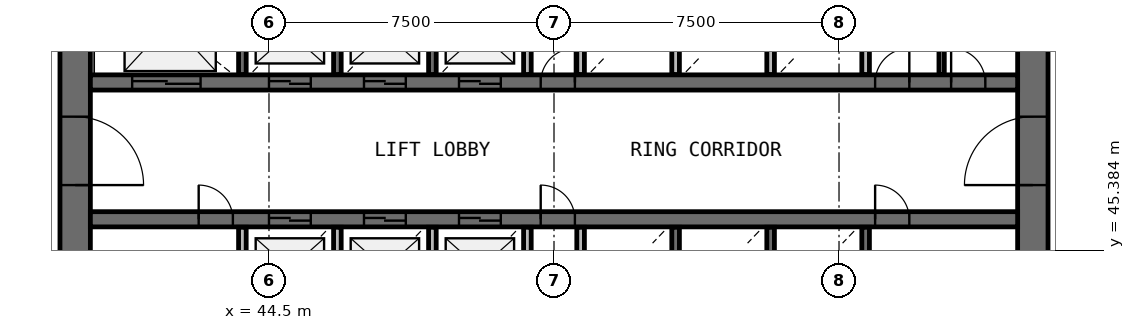
"""IFC4 building model, lengths in metres.
Left out: names, types, materials, properties, quantities, classifications, styles, units other than length and angle.
Written with IfcOpenShell. Run it as: python <this file> out.ifc"""

import sys

from ifc_helpers import new_model, si_unit, direction, frame, frame_2d, origin, place, context, subcontext, project, spatial, rectangle, extrude, source, transform, mapped, element, fill, save


model = new_model("IFC4")
c1 = context("Model", 3, precision=1e-05, world=origin(), true_north=direction((0.0, 1.0)))
c2 = subcontext(c1, "Body", "Model", "MODEL_VIEW")
j1 = project(units=[si_unit("LENGTHUNIT", "METRE"), si_unit("PLANEANGLEUNIT", "RADIAN")], contexts=[c1])
p1 = place(None, origin())
s1 = spatial("IfcSite", under=j1, at=p1, CompositionType="ELEMENT")
p2 = place(p1, origin())
s2 = spatial("IfcBuilding", under=s1, at=p2, CompositionType="ELEMENT")
p3 = place(p2, frame((0.0, 0.0, 88.0)))
s3 = spatial("IfcBuildingStorey", under=s2, at=p3, CompositionType="ELEMENT", Elevation=88.0)
p4 = place(p3, frame((64.6, 38.0, 0.0), z_axis=(0.0, 0.0, 1.0), x_axis=(0.0, 1.0, 0.0)))
e1 = element("IfcWall", 1, at=p4, inside=s3, PredefinedType="SHEAR", context=c2, shape_type="SweptSolid", body=[
    extrude(rectangle(XDim=20.0, YDim=0.8, at=frame_2d((10.0, 0.0))), origin(), (0.0, 0.0, 1.0), 4.1),
])
p5 = place(p4, frame((9.1, 0.0, 0.0)))
e2 = element("IfcOpeningElement", 2, at=p5, cuts=e1, PredefinedType="OPENING", context=c2, shape_type="SweptSolid", body=[
    extrude(rectangle(XDim=1.8, YDim=2.1, at=frame_2d((0.9, 1.05))), frame((0.0, 0.41, 0.0), z_axis=(0.0, -1.0, 0.0), x_axis=(1.0, 0.0, 0.0)), (0.0, 0.0, 1.0), 0.82),
])
p6 = place(p3, frame((39.4, 58.0, 0.0), z_axis=(0.0, 0.0, 1.0), x_axis=(0.0, -1.0, 0.0)))
e3 = element("IfcWall", 3, at=p6, inside=s3, PredefinedType="SHEAR", context=c2, shape_type="SweptSolid", body=[
    extrude(rectangle(XDim=20.0, YDim=0.8, at=frame_2d((10.0, 0.0))), origin(), (0.0, 0.0, 1.0), 4.1),
])
p7 = place(p6, frame((9.1, 0.0, 0.0)))
e4 = element("IfcOpeningElement", 4, at=p7, cuts=e3, PredefinedType="OPENING", context=c2, shape_type="SweptSolid", body=[
    extrude(rectangle(XDim=1.8, YDim=2.1, at=frame_2d((0.9, 1.05))), frame((0.0, 0.41, 0.0), z_axis=(0.0, -1.0, 0.0), x_axis=(1.0, 0.0, 0.0)), (0.0, 0.0, 1.0), 0.82),
])
p8 = place(p3, frame((39.8, 49.8, 0.0), z_axis=(0.0, 0.0, 1.0), x_axis=(1.0, 0.0, 0.0)))
e5 = element("IfcWall", 5, at=p8, inside=s3, PredefinedType="SHEAR", context=c2, shape_type="SweptSolid", body=[
    extrude(rectangle(XDim=24.4, YDim=0.4, at=frame_2d((12.2, 0.0))), origin(), (0.0, 0.0, 1.0), 4.1),
])
p9 = place(p8, frame((4.7, 0.0, 0.0)))
e6 = element("IfcOpeningElement", 6, at=p9, cuts=e5, PredefinedType="OPENING", context=c2, shape_type="SweptSolid", body=[
    extrude(rectangle(XDim=1.1, YDim=2.1, at=frame_2d((0.55, 1.05))), frame((0.0, 0.21, 0.0), z_axis=(0.0, -1.0, 0.0), x_axis=(1.0, 0.0, 0.0)), (0.0, 0.0, 1.0), 0.42),
])
p10 = place(p8, frame((7.2, 0.0, 0.0)))
e7 = element("IfcOpeningElement", 7, at=p10, cuts=e5, PredefinedType="OPENING", context=c2, shape_type="SweptSolid", body=[
    extrude(rectangle(XDim=1.1, YDim=2.1, at=frame_2d((0.55, 1.05))), frame((0.0, 0.21, 0.0), z_axis=(0.0, -1.0, 0.0), x_axis=(1.0, 0.0, 0.0)), (0.0, 0.0, 1.0), 0.42),
])
p11 = place(p8, frame((9.7, 0.0, 0.0)))
e8 = element("IfcOpeningElement", 8, at=p11, cuts=e5, PredefinedType="OPENING", context=c2, shape_type="SweptSolid", body=[
    extrude(rectangle(XDim=1.1, YDim=2.1, at=frame_2d((0.55, 1.05))), frame((0.0, 0.21, 0.0), z_axis=(0.0, -1.0, 0.0), x_axis=(1.0, 0.0, 0.0)), (0.0, 0.0, 1.0), 0.42),
])
p12 = place(p8, frame((1.1, 0.0, 0.0)))
e9 = element("IfcOpeningElement", 9, at=p12, cuts=e5, PredefinedType="OPENING", context=c2, shape_type="SweptSolid", body=[
    extrude(rectangle(XDim=1.8, YDim=2.4, at=frame_2d((0.9, 1.2))), frame((0.0, 0.21, 0.0), z_axis=(0.0, -1.0, 0.0), x_axis=(1.0, 0.0, 0.0)), (0.0, 0.0, 1.0), 0.42),
])
p13 = place(p8, frame((20.65, 0.0, 0.0)))
e10 = element("IfcOpeningElement", 10, at=p13, cuts=e5, PredefinedType="OPENING", context=c2, shape_type="SweptSolid", body=[
    extrude(rectangle(XDim=0.9, YDim=2.1, at=frame_2d((0.45, 1.05))), frame((0.0, 0.21, 0.0), z_axis=(0.0, -1.0, 0.0), x_axis=(1.0, 0.0, 0.0)), (0.0, 0.0, 1.0), 0.42),
])
p14 = place(p8, frame((22.65, 0.0, 0.0)))
e11 = element("IfcOpeningElement", 11, at=p14, cuts=e5, PredefinedType="OPENING", context=c2, shape_type="SweptSolid", body=[
    extrude(rectangle(XDim=0.9, YDim=2.1, at=frame_2d((0.45, 1.05))), frame((0.0, 0.21, 0.0), z_axis=(0.0, -1.0, 0.0), x_axis=(1.0, 0.0, 0.0)), (0.0, 0.0, 1.0), 0.42),
])
p15 = place(p8, frame((11.85, 0.0, 0.0)))
e12 = element("IfcOpeningElement", 12, at=p15, cuts=e5, PredefinedType="OPENING", context=c2, shape_type="SweptSolid", body=[
    extrude(rectangle(XDim=0.9, YDim=2.1, at=frame_2d((0.45, 1.05))), frame((0.0, 0.21, 0.0), z_axis=(0.0, -1.0, 0.0), x_axis=(1.0, 0.0, 0.0)), (0.0, 0.0, 1.0), 0.42),
])
p16 = place(p3, frame((39.8, 46.2, 0.0), z_axis=(0.0, 0.0, 1.0), x_axis=(1.0, 0.0, 0.0)))
e13 = element("IfcWall", 13, at=p16, inside=s3, PredefinedType="SHEAR", context=c2, shape_type="SweptSolid", body=[
    extrude(rectangle(XDim=24.4, YDim=0.4, at=frame_2d((12.2, 0.0))), origin(), (0.0, 0.0, 1.0), 4.1),
])
p17 = place(p16, frame((4.7, 0.0, 0.0)))
e14 = element("IfcOpeningElement", 14, at=p17, cuts=e13, PredefinedType="OPENING", context=c2, shape_type="SweptSolid", body=[
    extrude(rectangle(XDim=1.1, YDim=2.1, at=frame_2d((0.55, 1.05))), frame((0.0, 0.21, 0.0), z_axis=(0.0, -1.0, 0.0), x_axis=(1.0, 0.0, 0.0)), (0.0, 0.0, 1.0), 0.42),
])
p18 = place(p16, frame((7.2, 0.0, 0.0)))
e15 = element("IfcOpeningElement", 15, at=p18, cuts=e13, PredefinedType="OPENING", context=c2, shape_type="SweptSolid", body=[
    extrude(rectangle(XDim=1.1, YDim=2.1, at=frame_2d((0.55, 1.05))), frame((0.0, 0.21, 0.0), z_axis=(0.0, -1.0, 0.0), x_axis=(1.0, 0.0, 0.0)), (0.0, 0.0, 1.0), 0.42),
])
p19 = place(p16, frame((9.7, 0.0, 0.0)))
e16 = element("IfcOpeningElement", 16, at=p19, cuts=e13, PredefinedType="OPENING", context=c2, shape_type="SweptSolid", body=[
    extrude(rectangle(XDim=1.1, YDim=2.1, at=frame_2d((0.55, 1.05))), frame((0.0, 0.21, 0.0), z_axis=(0.0, -1.0, 0.0), x_axis=(1.0, 0.0, 0.0)), (0.0, 0.0, 1.0), 0.42),
])
p20 = place(p16, frame((20.65, 0.0, 0.0)))
e17 = element("IfcOpeningElement", 17, at=p20, cuts=e13, PredefinedType="OPENING", context=c2, shape_type="SweptSolid", body=[
    extrude(rectangle(XDim=0.9, YDim=2.1, at=frame_2d((0.45, 1.05))), frame((0.0, 0.21, 0.0), z_axis=(0.0, -1.0, 0.0), x_axis=(1.0, 0.0, 0.0)), (0.0, 0.0, 1.0), 0.42),
])
p21 = place(p16, frame((2.85, 0.0, 0.0)))
e18 = element("IfcOpeningElement", 18, at=p21, cuts=e13, PredefinedType="OPENING", context=c2, shape_type="SweptSolid", body=[
    extrude(rectangle(XDim=0.9, YDim=2.1, at=frame_2d((0.45, 1.05))), frame((0.0, 0.21, 0.0), z_axis=(0.0, -1.0, 0.0), x_axis=(1.0, 0.0, 0.0)), (0.0, 0.0, 1.0), 0.42),
])
p22 = place(p16, frame((11.85, 0.0, 0.0)))
e19 = element("IfcOpeningElement", 19, at=p22, cuts=e13, PredefinedType="OPENING", context=c2, shape_type="SweptSolid", body=[
    extrude(rectangle(XDim=0.9, YDim=2.1, at=frame_2d((0.45, 1.05))), frame((0.0, 0.21, 0.0), z_axis=(0.0, -1.0, 0.0), x_axis=(1.0, 0.0, 0.0)), (0.0, 0.0, 1.0), 0.42),
])
for number, where, z_axis, x_axis in (
    (20, (43.8, 45.99, 0.0), (0.0, 0.0, 1.0), (0.0, -1.0, 0.0)),
    (21, (43.8, 52.37, 0.0), (0.0, 0.0, 1.0), (0.0, -1.0, 0.0)),
):
    element("IfcWall", number, at=place(p3, frame(where, z_axis=z_axis, x_axis=x_axis)), inside=s3, PredefinedType="SOLIDWALL", context=c2, shape_type="SweptSolid", body=[
        extrude(rectangle(XDim=2.36, YDim=0.2, at=frame_2d((1.18, 0.0))), origin(), (0.0, 0.0, 1.0), 3.7),
    ])
p23 = place(p3, frame((46.3, 43.6, 0.0), z_axis=(0.0, 0.0, 1.0), x_axis=(0.0, 1.0, 0.0)))
e22 = element("IfcWall", 22, at=p23, inside=s3, PredefinedType="SOLIDWALL", context=c2, shape_type="SweptSolid", body=[
    extrude(rectangle(XDim=2.39, YDim=0.2, at=frame_2d((1.195, 0.0))), origin(), (0.0, 0.0, 1.0), 3.7),
])
for number, where, z_axis, x_axis in (
    (23, (46.3, 50.01, 0.0), (0.0, 0.0, 1.0), (0.0, 1.0, 0.0)),
    (24, (48.8, 43.63, 0.0), (0.0, 0.0, 1.0), (0.0, 1.0, 0.0)),
    (25, (48.8, 50.01, 0.0), (0.0, 0.0, 1.0), (0.0, 1.0, 0.0)),
    (26, (51.3, 43.63, 0.0), (0.0, 0.0, 1.0), (0.0, 1.0, 0.0)),
):
    element("IfcWall", number, at=place(p3, frame(where, z_axis=z_axis, x_axis=x_axis)), inside=s3, PredefinedType="SOLIDWALL", context=c2, shape_type="SweptSolid", body=[
        extrude(rectangle(XDim=2.36, YDim=0.2, at=frame_2d((1.18, 0.0))), origin(), (0.0, 0.0, 1.0), 3.7),
    ])
for number, where, z_axis, x_axis in (
    (27, (51.3, 50.01, 0.0), (0.0, 0.0, 1.0), (0.0, 1.0, 0.0)),
    (28, (52.7, 45.99, 0.0), (0.0, 0.0, 1.0), (0.0, -1.0, 0.0)),
):
    element("IfcWall", number, at=place(p3, frame(where, z_axis=z_axis, x_axis=x_axis)), inside=s3, PredefinedType="SOLIDWALL", context=c2, shape_type="SweptSolid", body=[
        extrude(rectangle(XDim=2.39, YDim=0.2, at=frame_2d((1.195, 0.0))), origin(), (0.0, 0.0, 1.0), 3.7),
    ])
for number, where, z_axis, x_axis in (
    (29, (52.7, 52.37, 0.0), (0.0, 0.0, 1.0), (0.0, -1.0, 0.0)),
    (30, (55.2, 43.63, 0.0), (0.0, 0.0, 1.0), (0.0, 1.0, 0.0)),
    (31, (55.2, 50.01, 0.0), (0.0, 0.0, 1.0), (0.0, 1.0, 0.0)),
    (32, (57.7, 43.63, 0.0), (0.0, 0.0, 1.0), (0.0, 1.0, 0.0)),
):
    element("IfcWall", number, at=place(p3, frame(where, z_axis=z_axis, x_axis=x_axis)), inside=s3, PredefinedType="SOLIDWALL", context=c2, shape_type="SweptSolid", body=[
        extrude(rectangle(XDim=2.36, YDim=0.2, at=frame_2d((1.18, 0.0))), origin(), (0.0, 0.0, 1.0), 3.7),
    ])
p24 = place(p3, frame((57.7, 50.01, 0.0), z_axis=(0.0, 0.0, 1.0), x_axis=(0.0, 1.0, 0.0)))
e33 = element("IfcWall", 33, at=p24, inside=s3, PredefinedType="SOLIDWALL", context=c2, shape_type="SweptSolid", body=[
    extrude(rectangle(XDim=2.39, YDim=0.2, at=frame_2d((1.195, 0.0))), origin(), (0.0, 0.0, 1.0), 3.7),
])
for number, where, z_axis, x_axis in (
    (34, (60.2, 43.63, 0.0), (0.0, 0.0, 1.0), (0.0, 1.0, 0.0)),
    (35, (60.2, 50.01, 0.0), (0.0, 0.0, 1.0), (0.0, 1.0, 0.0)),
):
    element("IfcWall", number, at=place(p3, frame(where, z_axis=z_axis, x_axis=x_axis)), inside=s3, PredefinedType="SOLIDWALL", context=c2, shape_type="SweptSolid", body=[
        extrude(rectangle(XDim=2.36, YDim=0.2, at=frame_2d((1.18, 0.0))), origin(), (0.0, 0.0, 1.0), 3.7),
    ])
p25 = place(p3, frame((62.2, 50.01, 0.0), z_axis=(0.0, 0.0, 1.0), x_axis=(0.0, 1.0, 0.0)))
e36 = element("IfcWall", 36, at=p25, inside=s3, PredefinedType="PARTITIONING", context=c2, shape_type="SweptSolid", body=[
    extrude(rectangle(XDim=2.39, YDim=0.14, at=frame_2d((1.195, 0.0))), origin(), (0.0, 0.0, 1.0), 2.9),
])
m1 = source(origin(), c2, "Body", "SweptSolid", [
    extrude(rectangle(XDim=1.8, YDim=2.1, at=frame_2d((0.9, 1.05))), frame((0.0, 0.025, 0.0), z_axis=(0.0, -1.0, 0.0), x_axis=(1.0, 0.0, 0.0)), (0.0, 0.0, 1.0), 0.05),
])
p26 = place(p7, origin())
e37 = element("IfcDoor", 37, at=p26, inside=s3, OperationType="SINGLE_SWING_RIGHT", PredefinedType="DOOR", context=c2, shape_type="MappedRepresentation", body=[
    mapped(m1, transform((0.0, 0.0, 0.0), scale=1.0)),
])
fill(e4, e37)
p27 = place(p5, origin())
e38 = element("IfcDoor", 38, at=p27, inside=s3, OperationType="SINGLE_SWING_LEFT", PredefinedType="DOOR", context=c2, shape_type="MappedRepresentation", body=[
    mapped(m1, transform((0.0, 0.0, 0.0), scale=1.0)),
])
fill(e2, e38)
m2 = source(origin(), c2, "Body", "SweptSolid", [
    extrude(rectangle(XDim=1.1, YDim=2.1, at=frame_2d((0.55, 1.05))), frame((0.0, 0.025, 0.0), z_axis=(0.0, -1.0, 0.0), x_axis=(1.0, 0.0, 0.0)), (0.0, 0.0, 1.0), 0.05),
])
p28 = place(p9, origin())
e39 = element("IfcDoor", 39, at=p28, inside=s3, OperationType="DOUBLE_DOOR_SLIDING", PredefinedType="USERDEFINED", context=c2, shape_type="MappedRepresentation", body=[
    mapped(m2, transform((0.0, 0.0, 0.0), scale=1.0)),
])
fill(e6, e39)
p29 = place(p10, origin())
e40 = element("IfcDoor", 40, at=p29, inside=s3, OperationType="DOUBLE_DOOR_SLIDING", PredefinedType="USERDEFINED", context=c2, shape_type="MappedRepresentation", body=[
    mapped(m2, transform((0.0, 0.0, 0.0), scale=1.0)),
])
fill(e7, e40)
p30 = place(p11, origin())
e41 = element("IfcDoor", 41, at=p30, inside=s3, OperationType="DOUBLE_DOOR_SLIDING", PredefinedType="USERDEFINED", context=c2, shape_type="MappedRepresentation", body=[
    mapped(m2, transform((0.0, 0.0, 0.0), scale=1.0)),
])
fill(e8, e41)
p31 = place(p17, origin())
e42 = element("IfcDoor", 42, at=p31, inside=s3, OperationType="DOUBLE_DOOR_SLIDING", PredefinedType="USERDEFINED", context=c2, shape_type="MappedRepresentation", body=[
    mapped(m2, transform((0.0, 0.0, 0.0), scale=1.0)),
])
fill(e14, e42)
p32 = place(p18, origin())
e43 = element("IfcDoor", 43, at=p32, inside=s3, OperationType="DOUBLE_DOOR_SLIDING", PredefinedType="USERDEFINED", context=c2, shape_type="MappedRepresentation", body=[
    mapped(m2, transform((0.0, 0.0, 0.0), scale=1.0)),
])
fill(e15, e43)
p33 = place(p19, origin())
e44 = element("IfcDoor", 44, at=p33, inside=s3, OperationType="DOUBLE_DOOR_SLIDING", PredefinedType="USERDEFINED", context=c2, shape_type="MappedRepresentation", body=[
    mapped(m2, transform((0.0, 0.0, 0.0), scale=1.0)),
])
fill(e16, e44)
m3 = source(origin(), c2, "Body", "SweptSolid", [
    extrude(rectangle(XDim=1.8, YDim=2.4, at=frame_2d((0.9, 1.2))), frame((0.0, 0.025, 0.0), z_axis=(0.0, -1.0, 0.0), x_axis=(1.0, 0.0, 0.0)), (0.0, 0.0, 1.0), 0.05),
])
p34 = place(p12, origin())
e45 = element("IfcDoor", 45, at=p34, inside=s3, OperationType="DOUBLE_DOOR_SLIDING", PredefinedType="USERDEFINED", context=c2, shape_type="MappedRepresentation", body=[
    mapped(m3, transform((0.0, 0.0, 0.0), scale=1.0)),
])
fill(e9, e45)
m4 = source(origin(), c2, "Body", "SweptSolid", [
    extrude(rectangle(XDim=0.9, YDim=2.1, at=frame_2d((0.45, 1.05))), frame((0.0, 0.025, 0.0), z_axis=(0.0, -1.0, 0.0), x_axis=(1.0, 0.0, 0.0)), (0.0, 0.0, 1.0), 0.05),
])
p35 = place(p20, origin())
e46 = element("IfcDoor", 46, at=p35, inside=s3, OperationType="SINGLE_SWING_LEFT", PredefinedType="DOOR", context=c2, shape_type="MappedRepresentation", body=[
    mapped(m4, transform((0.0, 0.0, 0.0), scale=1.0)),
])
fill(e17, e46)
p36 = place(p13, origin())
e47 = element("IfcDoor", 47, at=p36, inside=s3, OperationType="SINGLE_SWING_RIGHT", PredefinedType="DOOR", context=c2, shape_type="MappedRepresentation", body=[
    mapped(m4, transform((0.0, 0.0, 0.0), scale=1.0)),
])
fill(e10, e47)
p37 = place(p14, origin())
e48 = element("IfcDoor", 48, at=p37, inside=s3, OperationType="SINGLE_SWING_LEFT", PredefinedType="DOOR", context=c2, shape_type="MappedRepresentation", body=[
    mapped(m4, transform((0.0, 0.0, 0.0), scale=1.0)),
])
fill(e11, e48)
p38 = place(p21, origin())
e49 = element("IfcDoor", 49, at=p38, inside=s3, OperationType="SINGLE_SWING_LEFT", PredefinedType="DOOR", context=c2, shape_type="MappedRepresentation", body=[
    mapped(m4, transform((0.0, 0.0, 0.0), scale=1.0)),
])
fill(e18, e49)
p39 = place(p15, origin())
e50 = element("IfcDoor", 50, at=p39, inside=s3, OperationType="SINGLE_SWING_RIGHT", PredefinedType="DOOR", context=c2, shape_type="MappedRepresentation", body=[
    mapped(m4, transform((0.0, 0.0, 0.0), scale=1.0)),
])
fill(e12, e50)
p40 = place(p22, origin())
e51 = element("IfcDoor", 51, at=p40, inside=s3, OperationType="SINGLE_SWING_LEFT", PredefinedType="DOOR", context=c2, shape_type="MappedRepresentation", body=[
    mapped(m4, transform((0.0, 0.0, 0.0), scale=1.0)),
])
fill(e19, e51)
save(model, sys.argv[1])
